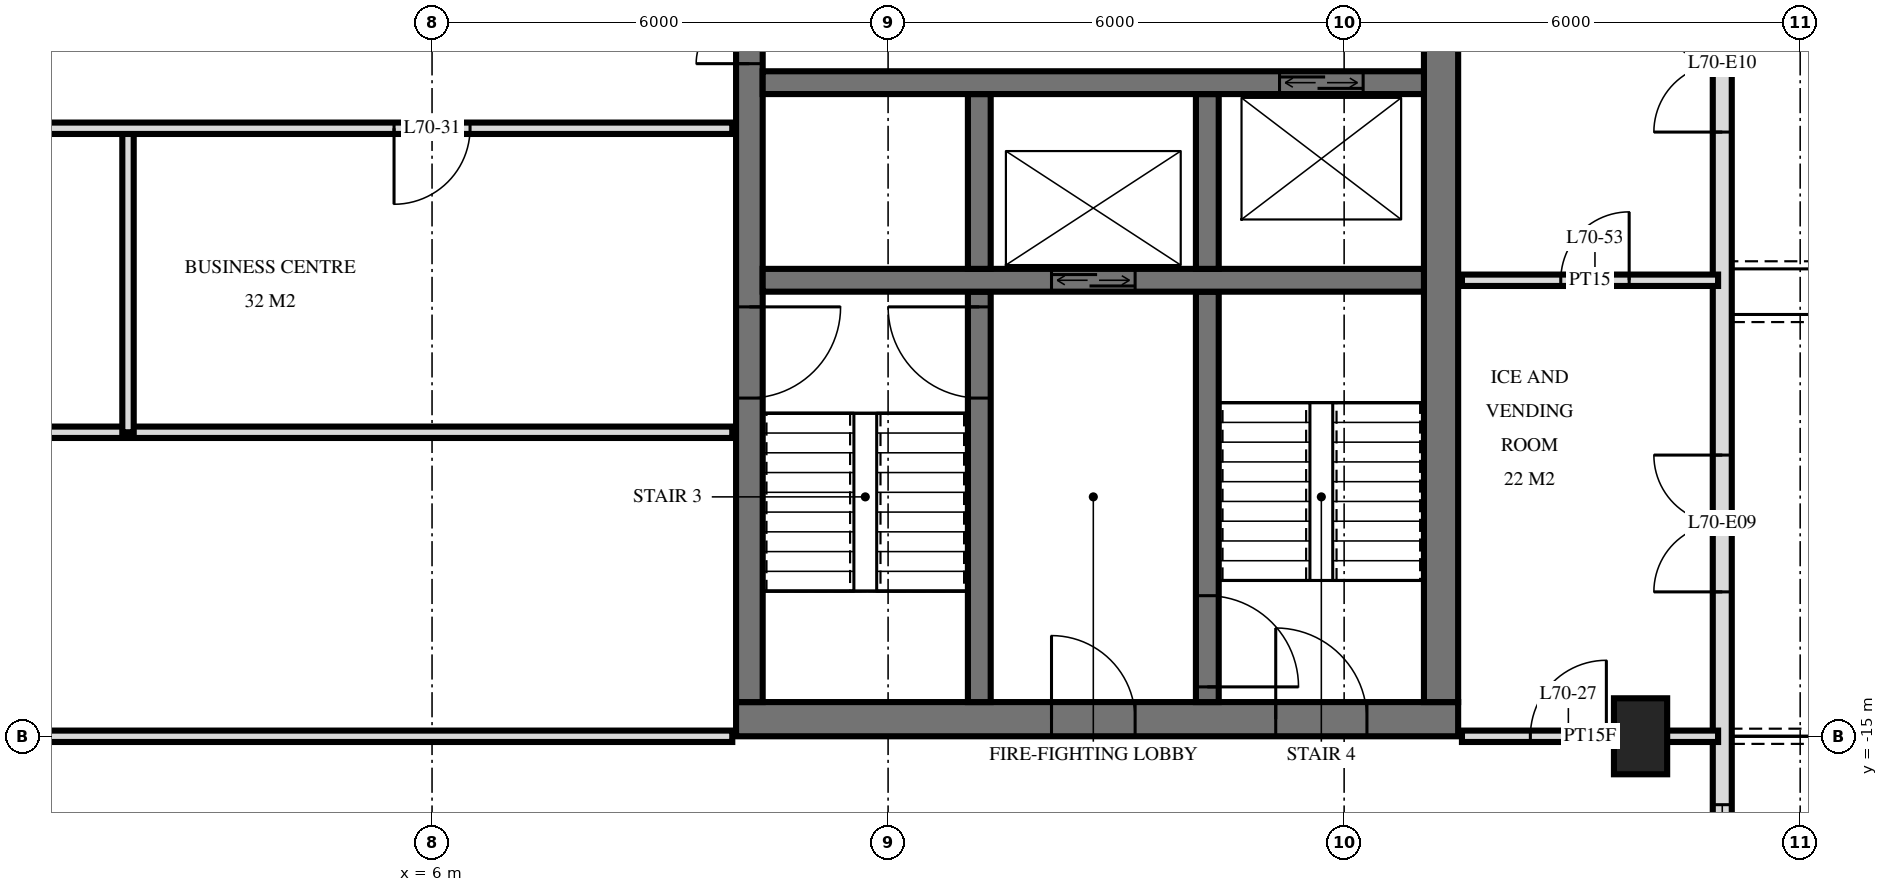
"""IFC4 building model, lengths in metres.
Left out: names, types, materials, properties, quantities, classifications, styles, units other than length and angle.
Written with IfcOpenShell. Run it as: python <this file> out.ifc"""

import sys

from ifc_helpers import new_model, si_unit, direction, frame, frame_2d, origin, origin_2d, place, context, subcontext, project, spatial, rectangle, extrude, element, fill, save


model = new_model("IFC4")
c1 = context("Model", 3, precision=1e-05, world=origin(), true_north=direction((0.0, 1.0)))
c2 = subcontext(c1, "Body", "Model", "MODEL_VIEW")
j1 = project(units=[si_unit("LENGTHUNIT", "METRE"), si_unit("PLANEANGLEUNIT", "RADIAN")], contexts=[c1])
p1 = place(None, origin())
s1 = spatial("IfcSite", under=j1, at=p1, CompositionType="ELEMENT")
p2 = place(p1, origin())
s2 = spatial("IfcBuilding", under=s1, at=p2, CompositionType="ELEMENT")
p3 = place(p2, frame((0.0, 0.0, 266.6)))
s3 = spatial("IfcBuildingStorey", under=s2, at=p3, CompositionType="ELEMENT", Elevation=266.6)
p4 = place(p3, frame((21.9, -15.0, 0.0), z_axis=(0.0, 0.0, 1.0), x_axis=(0.0, 1.0, 0.0)))
e1 = element("IfcColumn", 1, at=p4, inside=s3, PredefinedType="COLUMN", context=c2, shape_type="SweptSolid", body=[
    extrude(rectangle(XDim=1.0, YDim=0.7, at=origin_2d()), origin(), (0.0, 0.0, 1.0), 3.5),
])
p5 = place(p3, frame((10.0, -14.775, 0.0), z_axis=(0.0, 0.0, 1.0), x_axis=(1.0, 0.0, 0.0)))
e2 = element("IfcWall", 2, at=p5, inside=s3, PredefinedType="SHEAR", context=c2, shape_type="SweptSolid", body=[
    extrude(rectangle(XDim=9.5, YDim=0.45, at=frame_2d((4.75, 0.0))), origin(), (0.0, 0.0, 1.0), 3.5),
])
p6 = place(p5, frame((7.1, 0.0, 0.0)))
e3 = element("IfcOpeningElement", 3, at=p6, cuts=e2, PredefinedType="OPENING", context=c2, shape_type="SweptSolid", body=[
    extrude(rectangle(XDim=1.2, YDim=2.1, at=frame_2d((0.6, 1.05))), frame((0.0, 0.235, 0.0), z_axis=(0.0, -1.0, 0.0), x_axis=(1.0, 0.0, 0.0)), (0.0, 0.0, 1.0), 0.47),
])
p7 = place(p5, frame((4.15, 0.0, 0.0)))
e4 = element("IfcOpeningElement", 4, at=p7, cuts=e2, PredefinedType="OPENING", context=c2, shape_type="SweptSolid", body=[
    extrude(rectangle(XDim=1.1, YDim=2.1, at=frame_2d((0.55, 1.05))), frame((0.0, 0.235, 0.0), z_axis=(0.0, -1.0, 0.0), x_axis=(1.0, 0.0, 0.0)), (0.0, 0.0, 1.0), 0.47),
])
p8 = place(p3, frame((10.175, -14.55, 0.0), z_axis=(0.0, 0.0, 1.0), x_axis=(0.0, 1.0, 0.0)))
e5 = element("IfcWall", 5, at=p8, inside=s3, PredefinedType="SHEAR", context=c2, shape_type="SweptSolid", body=[
    extrude(rectangle(XDim=14.1, YDim=0.35, at=frame_2d((7.05, 0.0))), origin(), (0.0, 0.0, 1.0), 3.5),
])
p9 = place(p8, frame((8.4, 0.0, 0.0)))
e6 = element("IfcOpeningElement", 6, at=p9, cuts=e5, PredefinedType="OPENING", context=c2, shape_type="SweptSolid", body=[
    extrude(rectangle(XDim=1.4, YDim=2.4, at=frame_2d((0.7, 1.2))), frame((0.0, 0.185, 0.0), z_axis=(0.0, -1.0, 0.0), x_axis=(1.0, 0.0, 0.0)), (0.0, 0.0, 1.0), 0.37),
])
p10 = place(p8, frame((10.0, 0.0, 0.0)))
e7 = element("IfcOpeningElement", 7, at=p10, cuts=e5, PredefinedType="OPENING", context=c2, shape_type="SweptSolid", body=[
    extrude(rectangle(XDim=1.4, YDim=2.4, at=frame_2d((0.7, 1.2))), frame((0.0, 0.185, 0.0), z_axis=(0.0, -1.0, 0.0), x_axis=(1.0, 0.0, 0.0)), (0.0, 0.0, 1.0), 0.37),
])
p11 = place(p8, frame((4.0, 0.0, 0.0)))
e8 = element("IfcOpeningElement", 8, at=p11, cuts=e5, PredefinedType="OPENING", context=c2, shape_type="SweptSolid", body=[
    extrude(rectangle(XDim=1.2, YDim=2.1, at=frame_2d((0.6, 1.05))), frame((0.0, 0.185, 0.0), z_axis=(0.0, -1.0, 0.0), x_axis=(1.0, 0.0, 0.0)), (0.0, 0.0, 1.0), 0.37),
])
p12 = place(p3, frame((19.275, -14.55, 0.0), z_axis=(0.0, 0.0, 1.0), x_axis=(0.0, 1.0, 0.0)))
e9 = element("IfcWall", 9, at=p12, inside=s3, PredefinedType="SHEAR", context=c2, shape_type="SweptSolid", body=[
    extrude(rectangle(XDim=14.1, YDim=0.45, at=frame_2d((7.05, 0.0))), origin(), (0.0, 0.0, 1.0), 3.5),
])
p13 = place(p3, frame((10.35, -6.4, 0.0), z_axis=(0.0, 0.0, 1.0), x_axis=(1.0, 0.0, 0.0)))
e10 = element("IfcWall", 10, at=p13, inside=s3, PredefinedType="SHEAR", context=c2, shape_type="SweptSolid", body=[
    extrude(rectangle(XDim=8.7, YDim=0.3, at=frame_2d((4.35, 0.0))), origin(), (0.0, 0.0, 1.0), 3.5),
])
p14 = place(p13, frame((6.8, 0.0, 0.0)))
e11 = element("IfcOpeningElement", 11, at=p14, cuts=e10, PredefinedType="OPENING", context=c2, shape_type="SweptSolid", body=[
    extrude(rectangle(XDim=1.1, YDim=2.1, at=frame_2d((0.55, 1.05))), frame((0.0, 0.16, 0.0), z_axis=(0.0, -1.0, 0.0), x_axis=(1.0, 0.0, 0.0)), (0.0, 0.0, 1.0), 0.32),
])
p15 = place(p3, frame((10.35, -9.0, 0.0), z_axis=(0.0, 0.0, 1.0), x_axis=(1.0, 0.0, 0.0)))
e12 = element("IfcWall", 12, at=p15, inside=s3, PredefinedType="SHEAR", context=c2, shape_type="SweptSolid", body=[
    extrude(rectangle(XDim=8.7, YDim=0.3, at=frame_2d((4.35, 0.0))), origin(), (0.0, 0.0, 1.0), 3.5),
])
p16 = place(p15, frame((3.8, 0.0, 0.0)))
e13 = element("IfcOpeningElement", 13, at=p16, cuts=e12, PredefinedType="OPENING", context=c2, shape_type="SweptSolid", body=[
    extrude(rectangle(XDim=1.1, YDim=2.1, at=frame_2d((0.55, 1.05))), frame((0.0, 0.16, 0.0), z_axis=(0.0, -1.0, 0.0), x_axis=(1.0, 0.0, 0.0)), (0.0, 0.0, 1.0), 0.32),
])
p17 = place(p3, frame((13.2, -8.85, 0.0), z_axis=(0.0, 0.0, 1.0), x_axis=(0.0, 1.0, 0.0)))
e14 = element("IfcWall", 14, at=p17, inside=s3, PredefinedType="SHEAR", context=c2, shape_type="SweptSolid", body=[
    extrude(rectangle(XDim=2.3, YDim=0.3, at=frame_2d((1.15, 0.0))), origin(), (0.0, 0.0, 1.0), 3.5),
])
p18 = place(p3, frame((13.2, -14.55, 0.0), z_axis=(0.0, 0.0, 1.0), x_axis=(0.0, 1.0, 0.0)))
e15 = element("IfcWall", 15, at=p18, inside=s3, PredefinedType="SHEAR", context=c2, shape_type="SweptSolid", body=[
    extrude(rectangle(XDim=5.4, YDim=0.3, at=frame_2d((2.7, 0.0))), origin(), (0.0, 0.0, 1.0), 3.5),
])
p19 = place(p18, frame((4.0, 0.0, 0.0)))
e16 = element("IfcOpeningElement", 16, at=p19, cuts=e15, PredefinedType="OPENING", context=c2, shape_type="SweptSolid", body=[
    extrude(rectangle(XDim=1.2, YDim=2.1, at=frame_2d((0.6, 1.05))), frame((0.0, 0.16, 0.0), z_axis=(0.0, -1.0, 0.0), x_axis=(1.0, 0.0, 0.0)), (0.0, 0.0, 1.0), 0.32),
])
p20 = place(p3, frame((16.2, -8.85, 0.0), z_axis=(0.0, 0.0, 1.0), x_axis=(0.0, 1.0, 0.0)))
e17 = element("IfcWall", 17, at=p20, inside=s3, PredefinedType="SHEAR", context=c2, shape_type="SweptSolid", body=[
    extrude(rectangle(XDim=2.3, YDim=0.3, at=frame_2d((1.15, 0.0))), origin(), (0.0, 0.0, 1.0), 3.5),
])
p21 = place(p3, frame((16.2, -14.55, 0.0), z_axis=(0.0, 0.0, 1.0), x_axis=(0.0, 1.0, 0.0)))
e18 = element("IfcWall", 18, at=p21, inside=s3, PredefinedType="SHEAR", context=c2, shape_type="SweptSolid", body=[
    extrude(rectangle(XDim=5.4, YDim=0.3, at=frame_2d((2.7, 0.0))), origin(), (0.0, 0.0, 1.0), 3.5),
])
p22 = place(p21, frame((0.2, 0.0, 0.0)))
e19 = element("IfcOpeningElement", 19, at=p22, cuts=e18, PredefinedType="OPENING", context=c2, shape_type="SweptSolid", body=[
    extrude(rectangle(XDim=1.2, YDim=2.1, at=frame_2d((0.6, 1.05))), frame((0.0, 0.16, 0.0), z_axis=(0.0, -1.0, 0.0), x_axis=(1.0, 0.0, 0.0)), (0.0, 0.0, 1.0), 0.32),
])
p23 = place(p3, frame((22.975, -29.275, 0.0), z_axis=(0.0, 0.0, 1.0), x_axis=(0.0, 1.0, 0.0)))
e20 = element("IfcWall", 20, at=p23, inside=s3, PredefinedType="SOLIDWALL", context=c2, shape_type="SweptSolid", body=[
    extrude(rectangle(XDim=25.951, YDim=0.25, at=frame_2d((12.975, 0.0))), origin(), (0.0, 0.0, 1.0), 3.22),
])
p24 = place(p23, frame((0.575, 0.0, 0.0)))
e21 = element("IfcOpeningElement", 21, at=p24, cuts=e20, PredefinedType="OPENING", context=c2, shape_type="SweptSolid", body=[
    extrude(rectangle(XDim=1.8, YDim=2.4, at=frame_2d((0.9, 1.2))), frame((0.0, 0.135, 0.0), z_axis=(0.0, -1.0, 0.0), x_axis=(1.0, 0.0, 0.0)), (0.0, 0.0, 1.0), 0.27),
])
p25 = place(p23, frame((3.325, 0.0, 0.9)))
e22 = element("IfcOpeningElement", 22, at=p25, cuts=e20, PredefinedType="OPENING", context=c2, shape_type="SweptSolid", body=[
    extrude(rectangle(XDim=1.8, YDim=1.5, at=frame_2d((0.9, 0.75))), frame((0.0, 0.135, 0.0), z_axis=(0.0, -1.0, 0.0), x_axis=(1.0, 0.0, 0.0)), (0.0, 0.0, 1.0), 0.27),
])
p26 = place(p23, frame((8.375, 0.0, 0.0)))
e23 = element("IfcOpeningElement", 23, at=p26, cuts=e20, PredefinedType="OPENING", context=c2, shape_type="SweptSolid", body=[
    extrude(rectangle(XDim=1.8, YDim=2.4, at=frame_2d((0.9, 1.2))), frame((0.0, 0.135, 0.0), z_axis=(0.0, -1.0, 0.0), x_axis=(1.0, 0.0, 0.0)), (0.0, 0.0, 1.0), 0.27),
])
p27 = place(p23, frame((12.175, 0.0, 0.9)))
e24 = element("IfcOpeningElement", 24, at=p27, cuts=e20, PredefinedType="OPENING", context=c2, shape_type="SweptSolid", body=[
    extrude(rectangle(XDim=1.2, YDim=1.5, at=frame_2d((0.6, 0.75))), frame((0.0, 0.135, 0.0), z_axis=(0.0, -1.0, 0.0), x_axis=(1.0, 0.0, 0.0)), (0.0, 0.0, 1.0), 0.27),
])
p28 = place(p23, frame((16.175, 0.0, 0.0)))
e25 = element("IfcOpeningElement", 25, at=p28, cuts=e20, PredefinedType="OPENING", context=c2, shape_type="SweptSolid", body=[
    extrude(rectangle(XDim=1.8, YDim=2.4, at=frame_2d((0.9, 1.2))), frame((0.0, 0.135, 0.0), z_axis=(0.0, -1.0, 0.0), x_axis=(1.0, 0.0, 0.0)), (0.0, 0.0, 1.0), 0.27),
])
p29 = place(p23, frame((22.225, 0.0, 0.0)))
e26 = element("IfcOpeningElement", 26, at=p29, cuts=e20, PredefinedType="OPENING", context=c2, shape_type="SweptSolid", body=[
    extrude(rectangle(XDim=1.8, YDim=2.4, at=frame_2d((0.9, 1.2))), frame((0.0, 0.135, 0.0), z_axis=(0.0, -1.0, 0.0), x_axis=(1.0, 0.0, 0.0)), (0.0, 0.0, 1.0), 0.27),
])
p30 = place(p3, frame((2.0, -11.0, 0.0), z_axis=(0.0, 0.0, 1.0), x_axis=(0.0, 1.0, 0.0)))
e27 = element("IfcWall", 27, at=p30, inside=s3, PredefinedType="PARTITIONING", context=c2, shape_type="SweptSolid", body=[
    extrude(rectangle(XDim=4.0, YDim=0.15, at=frame_2d((2.0, 0.0))), origin(), (0.0, 0.0, 1.0), 3.22),
])
p31 = place(p3, frame((-9.95, -15.0, 0.0), z_axis=(0.0, 0.0, 1.0), x_axis=(1.0, 0.0, 0.0)))
e28 = element("IfcWall", 28, at=p31, inside=s3, PredefinedType="PARTITIONING", context=c2, shape_type="SweptSolid", body=[
    extrude(rectangle(XDim=19.9, YDim=0.15, at=frame_2d((9.95, 0.0))), origin(), (0.0, 0.0, 1.0), 2.584),
])
p32 = place(p31, frame((9.45, 0.0, 0.0)))
e29 = element("IfcOpeningElement", 29, at=p32, cuts=e28, PredefinedType="OPENING", context=c2, shape_type="SweptSolid", body=[
    extrude(rectangle(XDim=1.0, YDim=2.1, at=frame_2d((0.5, 1.05))), frame((0.0, 0.085, 0.0), z_axis=(0.0, -1.0, 0.0), x_axis=(1.0, 0.0, 0.0)), (0.0, 0.0, 1.0), 0.17),
])
p33 = place(p3, frame((19.55, -15.0, 0.0), z_axis=(0.0, 0.0, 1.0), x_axis=(1.0, 0.0, 0.0)))
e30 = element("IfcWall", 30, at=p33, inside=s3, PredefinedType="PARTITIONING", context=c2, shape_type="SweptSolid", body=[
    extrude(rectangle(XDim=3.37, YDim=0.15, at=frame_2d((1.685, 0.0))), origin(), (0.0, 0.0, 1.0), 3.22),
])
p34 = place(p33, frame((0.9, 0.0, 0.0)))
e31 = element("IfcOpeningElement", 31, at=p34, cuts=e30, PredefinedType="OPENING", context=c2, shape_type="SweptSolid", body=[
    extrude(rectangle(XDim=1.0, YDim=2.1, at=frame_2d((0.5, 1.05))), frame((0.0, 0.085, 0.0), z_axis=(0.0, -1.0, 0.0), x_axis=(1.0, 0.0, 0.0)), (0.0, 0.0, 1.0), 0.17),
])
p35 = place(p3, frame((-9.95, -11.0, 0.0), z_axis=(0.0, 0.0, 1.0), x_axis=(1.0, 0.0, 0.0)))
e32 = element("IfcWall", 32, at=p35, inside=s3, PredefinedType="PARTITIONING", context=c2, shape_type="SweptSolid", body=[
    extrude(rectangle(XDim=19.9, YDim=0.15, at=frame_2d((9.95, 0.0))), origin(), (0.0, 0.0, 1.0), 3.22),
])
p36 = place(p35, frame((9.45, 0.0, 0.0)))
e33 = element("IfcOpeningElement", 33, at=p36, cuts=e32, PredefinedType="OPENING", context=c2, shape_type="SweptSolid", body=[
    extrude(rectangle(XDim=1.0, YDim=2.1, at=frame_2d((0.5, 1.05))), frame((0.0, 0.085, 0.0), z_axis=(0.0, -1.0, 0.0), x_axis=(1.0, 0.0, 0.0)), (0.0, 0.0, 1.0), 0.17),
])
p37 = place(p35, frame((3.45, 0.0, 0.0)))
e34 = element("IfcOpeningElement", 34, at=p37, cuts=e32, PredefinedType="OPENING", context=c2, shape_type="SweptSolid", body=[
    extrude(rectangle(XDim=1.0, YDim=2.1, at=frame_2d((0.5, 1.05))), frame((0.0, 0.085, 0.0), z_axis=(0.0, -1.0, 0.0), x_axis=(1.0, 0.0, 0.0)), (0.0, 0.0, 1.0), 0.17),
])
p38 = place(p3, frame((19.55, -9.0, 0.0), z_axis=(0.0, 0.0, 1.0), x_axis=(1.0, 0.0, 0.0)))
e35 = element("IfcWall", 35, at=p38, inside=s3, PredefinedType="PARTITIONING", context=c2, shape_type="SweptSolid", body=[
    extrude(rectangle(XDim=3.37, YDim=0.15, at=frame_2d((1.685, 0.0))), origin(), (0.0, 0.0, 1.0), 3.22),
])
p39 = place(p38, frame((1.3, 0.0, 0.0)))
e36 = element("IfcOpeningElement", 36, at=p39, cuts=e35, PredefinedType="OPENING", context=c2, shape_type="SweptSolid", body=[
    extrude(rectangle(XDim=0.9, YDim=2.1, at=frame_2d((0.45, 1.05))), frame((0.0, 0.085, 0.0), z_axis=(0.0, -1.0, 0.0), x_axis=(1.0, 0.0, 0.0)), (0.0, 0.0, 1.0), 0.17),
])
p40 = place(p3, frame((-9.95, -7.0, 0.0), z_axis=(0.0, 0.0, 1.0), x_axis=(1.0, 0.0, 0.0)))
e37 = element("IfcWall", 37, at=p40, inside=s3, PredefinedType="PARTITIONING", context=c2, shape_type="SweptSolid", body=[
    extrude(rectangle(XDim=19.9, YDim=0.15, at=frame_2d((9.95, 0.0))), origin(), (0.0, 0.0, 1.0), 3.22),
])
p41 = place(p40, frame((9.45, 0.0, 0.0)))
e38 = element("IfcOpeningElement", 38, at=p41, cuts=e37, PredefinedType="OPENING", context=c2, shape_type="SweptSolid", body=[
    extrude(rectangle(XDim=1.0, YDim=2.1, at=frame_2d((0.5, 1.05))), frame((0.0, 0.085, 0.0), z_axis=(0.0, -1.0, 0.0), x_axis=(1.0, 0.0, 0.0)), (0.0, 0.0, 1.0), 0.17),
])
p42 = place(p40, frame((15.45, 0.0, 0.0)))
e39 = element("IfcOpeningElement", 39, at=p42, cuts=e37, PredefinedType="OPENING", context=c2, shape_type="SweptSolid", body=[
    extrude(rectangle(XDim=1.0, YDim=2.1, at=frame_2d((0.5, 1.05))), frame((0.0, 0.085, 0.0), z_axis=(0.0, -1.0, 0.0), x_axis=(1.0, 0.0, 0.0)), (0.0, 0.0, 1.0), 0.17),
])
p43 = place(p27, origin())
e40 = element("IfcWindow", 40, at=p43, inside=s3, PartitioningType="SINGLE_PANEL", PredefinedType="WINDOW", context=c2, shape_type="SweptSolid", body=[
    extrude(rectangle(XDim=1.2, YDim=1.5, at=frame_2d((0.6, 0.75))), frame((0.0, 0.03, 0.0), z_axis=(0.0, -1.0, 0.0), x_axis=(1.0, 0.0, 0.0)), (0.0, 0.0, 1.0), 0.06),
])
fill(e24, e40)
p44 = place(p28, origin())
e41 = element("IfcDoor", 41, at=p44, inside=s3, OperationType="DOUBLE_DOOR_SINGLE_SWING", PredefinedType="DOOR", context=c2, shape_type="SweptSolid", body=[
    extrude(rectangle(XDim=1.8, YDim=2.4, at=frame_2d((0.9, 1.2))), frame((0.0, 0.025, 0.0), z_axis=(0.0, -1.0, 0.0), x_axis=(1.0, 0.0, 0.0)), (0.0, 0.0, 1.0), 0.05),
])
fill(e25, e41)
p45 = place(p29, origin())
e42 = element("IfcDoor", 42, at=p45, inside=s3, OperationType="DOUBLE_DOOR_SINGLE_SWING", PredefinedType="DOOR", context=c2, shape_type="SweptSolid", body=[
    extrude(rectangle(XDim=1.8, YDim=2.4, at=frame_2d((0.9, 1.2))), frame((0.0, 0.025, 0.0), z_axis=(0.0, -1.0, 0.0), x_axis=(1.0, 0.0, 0.0)), (0.0, 0.0, 1.0), 0.05),
])
fill(e26, e42)
p46 = place(p16, origin())
e43 = element("IfcDoor", 43, at=p46, inside=s3, OperationType="DOUBLE_DOOR_SLIDING", PredefinedType="USERDEFINED", context=c2, shape_type="SweptSolid", body=[
    extrude(rectangle(XDim=1.1, YDim=2.1, at=frame_2d((0.55, 1.05))), frame((0.0, 0.025, 0.0), z_axis=(0.0, -1.0, 0.0), x_axis=(1.0, 0.0, 0.0)), (0.0, 0.0, 1.0), 0.05),
])
fill(e13, e43)
p47 = place(p14, origin())
e44 = element("IfcDoor", 44, at=p47, inside=s3, OperationType="DOUBLE_DOOR_SLIDING", PredefinedType="USERDEFINED", context=c2, shape_type="SweptSolid", body=[
    extrude(rectangle(XDim=1.1, YDim=2.1, at=frame_2d((0.55, 1.05))), frame((0.0, 0.025, 0.0), z_axis=(0.0, -1.0, 0.0), x_axis=(1.0, 0.0, 0.0)), (0.0, 0.0, 1.0), 0.05),
])
fill(e11, e44)
p48 = place(p9, origin())
e45 = element("IfcDoor", 45, at=p48, inside=s3, OperationType="DOUBLE_DOOR_SINGLE_SWING", PredefinedType="DOOR", context=c2, shape_type="SweptSolid", body=[
    extrude(rectangle(XDim=1.4, YDim=2.4, at=frame_2d((0.7, 1.2))), frame((0.0, 0.025, 0.0), z_axis=(0.0, -1.0, 0.0), x_axis=(1.0, 0.0, 0.0)), (0.0, 0.0, 1.0), 0.05),
])
fill(e6, e45)
p49 = place(p11, frame((0.6, 0.0, 0.0), z_axis=(0.0, 0.0, 1.0), x_axis=(-1.0, 0.0, 0.0)))
e46 = element("IfcDoor", 46, at=p49, inside=s3, OperationType="SINGLE_SWING_RIGHT", PredefinedType="DOOR", context=c2, shape_type="SweptSolid", body=[
    extrude(rectangle(XDim=1.2, YDim=2.1, at=frame_2d((0.0, 1.05))), frame((0.0, -0.025, 0.0), z_axis=(0.0, 1.0, 0.0), x_axis=(-1.0, 0.0, 0.0)), (0.0, 0.0, 1.0), 0.05),
])
fill(e8, e46)
p50 = place(p6, origin())
e47 = element("IfcDoor", 47, at=p50, inside=s3, OperationType="SINGLE_SWING_RIGHT", PredefinedType="DOOR", context=c2, shape_type="SweptSolid", body=[
    extrude(rectangle(XDim=1.2, YDim=2.1, at=frame_2d((0.6, 1.05))), frame((0.0, 0.025, 0.0), z_axis=(0.0, -1.0, 0.0), x_axis=(1.0, 0.0, 0.0)), (0.0, 0.0, 1.0), 0.05),
])
fill(e3, e47)
p51 = place(p7, origin())
e48 = element("IfcDoor", 48, at=p51, inside=s3, OperationType="SINGLE_SWING_RIGHT", PredefinedType="DOOR", context=c2, shape_type="SweptSolid", body=[
    extrude(rectangle(XDim=1.1, YDim=2.1, at=frame_2d((0.55, 1.05))), frame((0.0, 0.025, 0.0), z_axis=(0.0, -1.0, 0.0), x_axis=(1.0, 0.0, 0.0)), (0.0, 0.0, 1.0), 0.05),
])
fill(e4, e48)
p52 = place(p19, origin())
e49 = element("IfcDoor", 49, at=p52, inside=s3, OperationType="SINGLE_SWING_LEFT", PredefinedType="DOOR", context=c2, shape_type="SweptSolid", body=[
    extrude(rectangle(XDim=1.2, YDim=2.1, at=frame_2d((0.6, 1.05))), frame((0.0, 0.025, 0.0), z_axis=(0.0, -1.0, 0.0), x_axis=(1.0, 0.0, 0.0)), (0.0, 0.0, 1.0), 0.05),
])
fill(e16, e49)
p53 = place(p22, frame((0.6, 0.0, 0.0), z_axis=(0.0, 0.0, 1.0), x_axis=(-1.0, 0.0, 0.0)))
e50 = element("IfcDoor", 50, at=p53, inside=s3, OperationType="SINGLE_SWING_LEFT", PredefinedType="DOOR", context=c2, shape_type="SweptSolid", body=[
    extrude(rectangle(XDim=1.2, YDim=2.1, at=frame_2d((0.0, 1.05))), frame((0.0, -0.025, 0.0), z_axis=(0.0, 1.0, 0.0), x_axis=(-1.0, 0.0, 0.0)), (0.0, 0.0, 1.0), 0.05),
])
fill(e19, e50)
p54 = place(p34, origin())
e51 = element("IfcDoor", 51, at=p54, inside=s3, OperationType="SINGLE_SWING_LEFT", PredefinedType="DOOR", context=c2, shape_type="SweptSolid", body=[
    extrude(rectangle(XDim=1.0, YDim=2.1, at=frame_2d((0.5, 1.05))), frame((0.0, 0.025, 0.0), z_axis=(0.0, -1.0, 0.0), x_axis=(1.0, 0.0, 0.0)), (0.0, 0.0, 1.0), 0.05),
])
fill(e31, e51)
p55 = place(p42, frame((0.5, 0.0, 0.0), z_axis=(0.0, 0.0, 1.0), x_axis=(-1.0, 0.0, 0.0)))
e52 = element("IfcDoor", 52, at=p55, inside=s3, OperationType="SINGLE_SWING_LEFT", PredefinedType="DOOR", context=c2, shape_type="SweptSolid", body=[
    extrude(rectangle(XDim=1.0, YDim=2.1, at=frame_2d((0.0, 1.05))), frame((0.0, -0.025, 0.0), z_axis=(0.0, 1.0, 0.0), x_axis=(-1.0, 0.0, 0.0)), (0.0, 0.0, 1.0), 0.05),
])
fill(e39, e52)
p56 = place(p39, origin())
e53 = element("IfcDoor", 53, at=p56, inside=s3, OperationType="SINGLE_SWING_LEFT", PredefinedType="DOOR", context=c2, shape_type="SweptSolid", body=[
    extrude(rectangle(XDim=0.9, YDim=2.1, at=frame_2d((0.45, 1.05))), frame((0.0, 0.025, 0.0), z_axis=(0.0, -1.0, 0.0), x_axis=(1.0, 0.0, 0.0)), (0.0, 0.0, 1.0), 0.05),
])
fill(e36, e53)
save(model, sys.argv[1])
